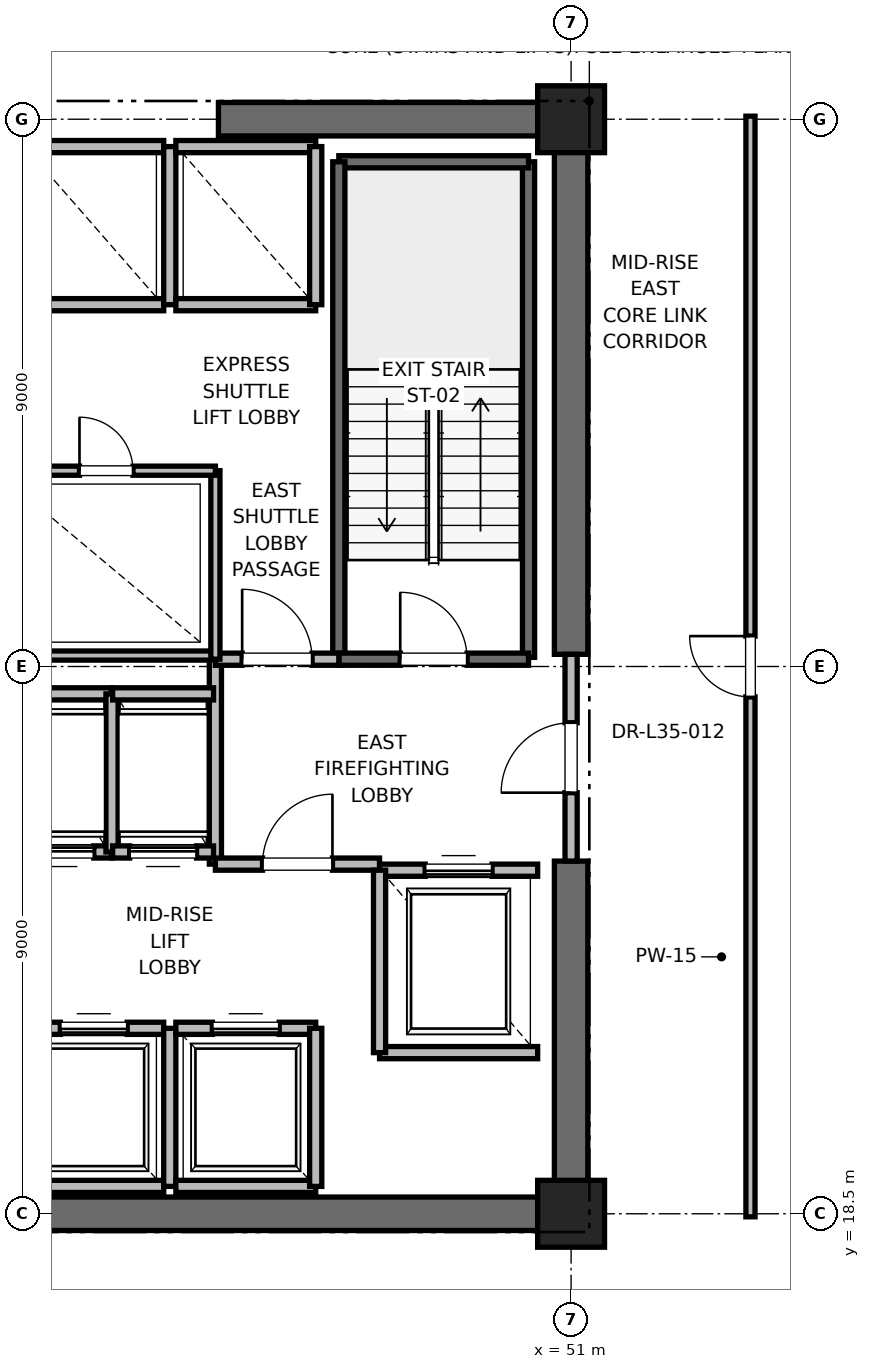
"""IFC4 building model, lengths in metres.
Left out: names, types, materials, properties, quantities, classifications, styles, units other than length and angle.
Written with IfcOpenShell. Run it as: python <this file> out.ifc"""

import sys

from ifc_helpers import new_model, si_unit, direction, frame, frame_2d, origin, origin_2d, place, context, subcontext, project, spatial, rectangle, extrude, element, fill, save


model = new_model("IFC4")
c1 = context("Model", 3, precision=1e-05, world=origin(), true_north=direction((0.0, 1.0)))
c2 = subcontext(c1, "Body", "Model", "MODEL_VIEW")
j1 = project(units=[si_unit("LENGTHUNIT", "METRE"), si_unit("PLANEANGLEUNIT", "RADIAN")], contexts=[c1])
p1 = place(None, origin())
s1 = spatial("IfcSite", under=j1, at=p1, CompositionType="ELEMENT")
p2 = place(p1, origin())
s2 = spatial("IfcBuilding", under=s1, at=p2, CompositionType="ELEMENT")
p3 = place(p2, frame((0.0, 0.0, 152.4)))
s3 = spatial("IfcBuildingStorey", under=s2, at=p3, CompositionType="ELEMENT", Elevation=152.4)
for number, where, z_axis, x_axis in (
    (1, (51.0, 18.5, 0.0), (0.0, 0.0, 1.0), (1.0, 0.0, 0.0)),
    (2, (51.0, 36.5, 0.0), (0.0, 0.0, 1.0), (1.0, 0.0, 0.0)),
):
    element("IfcColumn", number, at=place(p3, frame(where, z_axis=z_axis, x_axis=x_axis)), inside=s3, PredefinedType="PILASTER", context=c2, shape_type="SweptSolid", body=[
        extrude(rectangle(XDim=1.1, YDim=1.1, at=origin_2d()), origin(), (0.0, 0.0, 1.0), 4.0),
    ])
p4 = place(p3, frame((41.8, 18.5, 0.0), z_axis=(0.0, 0.0, 1.0), x_axis=(1.0, 0.0, 0.0)))
e3 = element("IfcWall", 3, at=p4, inside=s3, PredefinedType="SHEAR", context=c2, shape_type="SweptSolid", body=[
    extrude(rectangle(XDim=9.2, YDim=0.55, at=frame_2d((4.6, 0.0))), origin(), (0.0, 0.0, 1.0), 3.775),
])
for number, where, z_axis, x_axis in (
    (4, (45.2, 36.5, 0.0), (0.0, 0.0, 1.0), (1.0, 0.0, 0.0)),
    (5, (51.0, 18.5, 0.0), (0.0, 0.0, 1.0), (0.0, 1.0, 0.0)),
):
    element("IfcWall", number, at=place(p3, frame(where, z_axis=z_axis, x_axis=x_axis)), inside=s3, PredefinedType="SHEAR", context=c2, shape_type="SweptSolid", body=[
        extrude(rectangle(XDim=5.8, YDim=0.55, at=frame_2d((2.9, 0.0))), origin(), (0.0, 0.0, 1.0), 3.775),
    ])
p5 = place(p3, frame((51.0, 27.7, 0.0), z_axis=(0.0, 0.0, 1.0), x_axis=(0.0, 1.0, 0.0)))
e6 = element("IfcWall", 6, at=p5, inside=s3, PredefinedType="SHEAR", context=c2, shape_type="SweptSolid", body=[
    extrude(rectangle(XDim=8.8, YDim=0.55, at=frame_2d((4.4, 0.0))), origin(), (0.0, 0.0, 1.0), 3.775),
])
p6 = place(p3, frame((50.3, 27.65, 0.0), z_axis=(0.0, 0.0, 1.0), x_axis=(0.0, 1.0, 0.0)))
e7 = element("IfcWall", 7, at=p6, inside=s3, PredefinedType="SOLIDWALL", context=c2, shape_type="SweptSolid", body=[
    extrude(rectangle(XDim=8.15, YDim=0.2, at=frame_2d((4.075, 0.0))), origin(), (0.0, 0.0, 1.0), 3.775),
])
p7 = place(p3, frame((47.18, 35.8, 0.0), z_axis=(0.0, 0.0, 1.0), x_axis=(1.0, 0.0, 0.0)))
e8 = element("IfcWall", 8, at=p7, inside=s3, PredefinedType="SOLIDWALL", context=c2, shape_type="SweptSolid", body=[
    extrude(rectangle(XDim=3.12, YDim=0.2, at=frame_2d((1.56, 0.0))), origin(), (0.0, 0.0, 1.0), 3.775),
])
p8 = place(p3, frame((47.18, 27.62, 0.0), z_axis=(0.0, 0.0, 1.0), x_axis=(0.0, 1.0, 0.0)))
e9 = element("IfcWall", 9, at=p8, inside=s3, PredefinedType="SOLIDWALL", context=c2, shape_type="SweptSolid", body=[
    extrude(rectangle(XDim=8.18, YDim=0.2, at=frame_2d((4.09, 0.0))), origin(), (0.0, 0.0, 1.0), 3.775),
])
p9 = place(p3, frame((47.18, 27.62, 0.0), z_axis=(0.0, 0.0, 1.0), x_axis=(1.0, 0.0, 0.0)))
e10 = element("IfcWall", 10, at=p9, inside=s3, PredefinedType="SOLIDWALL", context=c2, shape_type="SweptSolid", body=[
    extrude(rectangle(XDim=3.12, YDim=0.2, at=frame_2d((1.56, 0.0))), origin(), (0.0, 0.0, 1.0), 3.775),
])
p10 = place(p9, frame((1.01, 0.0, 0.0)))
e11 = element("IfcOpeningElement", 11, at=p10, cuts=e10, PredefinedType="OPENING", context=c2, shape_type="SweptSolid", body=[
    extrude(rectangle(XDim=1.1, YDim=2.15, at=frame_2d((0.55, 1.075))), frame((0.0, 0.1, 0.0), z_axis=(0.0, -1.0, 0.0), x_axis=(1.0, 0.0, 0.0)), (0.0, 0.0, 1.0), 0.2),
])
p11 = place(p3, frame((45.15, 24.25, 0.0), z_axis=(0.0, 0.0, 1.0), x_axis=(0.0, 1.0, 0.0)))
e12 = element("IfcWall", 12, at=p11, inside=s3, PredefinedType="PARTITIONING", context=c2, shape_type="SweptSolid", body=[
    extrude(rectangle(XDim=3.37, YDim=0.2, at=frame_2d((1.685, 0.0))), origin(), (0.0, 0.0, 1.0), 3.775),
])
p12 = place(p3, frame((45.15, 24.25, 0.0), z_axis=(0.0, 0.0, 1.0), x_axis=(1.0, 0.0, 0.0)))
e13 = element("IfcWall", 13, at=p12, inside=s3, PredefinedType="PARTITIONING", context=c2, shape_type="SweptSolid", body=[
    extrude(rectangle(XDim=2.7, YDim=0.2, at=frame_2d((1.35, 0.0))), origin(), (0.0, 0.0, 1.0), 3.775),
])
p13 = place(p12, frame((0.775, 0.0, 0.0)))
e14 = element("IfcOpeningElement", 14, at=p13, cuts=e13, PredefinedType="OPENING", context=c2, shape_type="SweptSolid", body=[
    extrude(rectangle(XDim=1.15, YDim=2.2, at=frame_2d((0.575, 1.1))), frame((0.0, 0.1, 0.0), z_axis=(0.0, -1.0, 0.0), x_axis=(1.0, 0.0, 0.0)), (0.0, 0.0, 1.0), 0.2),
])
p14 = place(p3, frame((45.15, 27.62, 0.0), z_axis=(0.0, 0.0, 1.0), x_axis=(1.0, 0.0, 0.0)))
e15 = element("IfcWall", 15, at=p14, inside=s3, PredefinedType="PARTITIONING", context=c2, shape_type="SweptSolid", body=[
    extrude(rectangle(XDim=2.03, YDim=0.2, at=frame_2d((1.015, 0.0))), origin(), (0.0, 0.0, 1.0), 3.775),
])
p15 = place(p14, frame((0.44, 0.0, 0.0)))
e16 = element("IfcOpeningElement", 16, at=p15, cuts=e15, PredefinedType="OPENING", context=c2, shape_type="SweptSolid", body=[
    extrude(rectangle(XDim=1.15, YDim=2.2, at=frame_2d((0.575, 1.1))), frame((0.0, 0.1, 0.0), z_axis=(0.0, -1.0, 0.0), x_axis=(1.0, 0.0, 0.0)), (0.0, 0.0, 1.0), 0.2),
])
p16 = place(p3, frame((51.0, 24.3, 0.0), z_axis=(0.0, 0.0, 1.0), x_axis=(0.0, 1.0, 0.0)))
e17 = element("IfcWall", 17, at=p16, inside=s3, PredefinedType="PARTITIONING", context=c2, shape_type="SweptSolid", body=[
    extrude(rectangle(XDim=3.4, YDim=0.2, at=frame_2d((1.7, 0.0))), origin(), (0.0, 0.0, 1.0), 2.755),
])
p17 = place(p16, frame((1.125, 0.0, 0.0)))
e18 = element("IfcOpeningElement", 18, at=p17, cuts=e17, PredefinedType="OPENING", context=c2, shape_type="SweptSolid", body=[
    extrude(rectangle(XDim=1.15, YDim=2.2, at=frame_2d((0.575, 1.1))), frame((0.0, 0.1, 0.0), z_axis=(0.0, -1.0, 0.0), x_axis=(1.0, 0.0, 0.0)), (0.0, 0.0, 1.0), 0.2),
])
p18 = place(p3, frame((47.85, 21.15, 0.0), z_axis=(0.0, 0.0, 1.0), x_axis=(1.0, 0.0, 0.0)))
e19 = element("IfcWall", 19, at=p18, inside=s3, PredefinedType="SOLIDWALL", context=c2, shape_type="SweptSolid", body=[
    extrude(rectangle(XDim=2.6, YDim=0.2, at=frame_2d((1.3, 0.0))), origin(), (0.0, 0.0, 1.0), 3.775),
])
p19 = place(p3, frame((50.45, 24.15, 0.0), z_axis=(0.0, 0.0, 1.0), x_axis=(-1.0, 0.0, 0.0)))
e20 = element("IfcWall", 20, at=p19, inside=s3, PredefinedType="SOLIDWALL", context=c2, shape_type="SweptSolid", body=[
    extrude(rectangle(XDim=2.6, YDim=0.2, at=frame_2d((1.3, 0.0))), origin(), (0.0, 0.0, 1.0), 2.755),
])
p20 = place(p19, frame((0.75, 0.0, 0.0)))
e21 = element("IfcOpeningElement", 21, at=p20, cuts=e20, PredefinedType="OPENING", context=c2, shape_type="SweptSolid", body=[
    extrude(rectangle(XDim=1.1, YDim=2.2, at=frame_2d((0.55, 1.1))), frame((0.0, 0.1, 0.0), z_axis=(0.0, -1.0, 0.0), x_axis=(1.0, 0.0, 0.0)), (0.0, 0.0, 1.0), 0.2),
])
p21 = place(p3, frame((47.85, 24.15, 0.0), z_axis=(0.0, 0.0, 1.0), x_axis=(0.0, -1.0, 0.0)))
e22 = element("IfcWall", 22, at=p21, inside=s3, PredefinedType="SOLIDWALL", context=c2, shape_type="SweptSolid", body=[
    extrude(rectangle(XDim=3.0, YDim=0.2, at=frame_2d((1.5, 0.0))), origin(), (0.0, 0.0, 1.0), 3.775),
])
p22 = place(p3, frame((42.0, 18.95, 0.0), z_axis=(0.0, 0.0, 1.0), x_axis=(1.0, 0.0, 0.0)))
e23 = element("IfcWall", 23, at=p22, inside=s3, PredefinedType="SOLIDWALL", context=c2, shape_type="SweptSolid", body=[
    extrude(rectangle(XDim=2.3, YDim=0.2, at=frame_2d((1.15, 0.0))), origin(), (0.0, 0.0, 1.0), 2.755),
])
p23 = place(p3, frame((44.3, 21.55, 0.0), z_axis=(0.0, 0.0, 1.0), x_axis=(-1.0, 0.0, 0.0)))
e24 = element("IfcWall", 24, at=p23, inside=s3, PredefinedType="SOLIDWALL", context=c2, shape_type="SweptSolid", body=[
    extrude(rectangle(XDim=2.3, YDim=0.2, at=frame_2d((1.15, 0.0))), origin(), (0.0, 0.0, 1.0), 3.775),
])
p24 = place(p23, frame((0.6, 0.0, 0.0)))
e25 = element("IfcOpeningElement", 25, at=p24, cuts=e24, PredefinedType="OPENING", context=c2, shape_type="SweptSolid", body=[
    extrude(rectangle(XDim=1.1, YDim=2.2, at=frame_2d((0.55, 1.1))), frame((0.0, 0.1, 0.0), z_axis=(0.0, -1.0, 0.0), x_axis=(1.0, 0.0, 0.0)), (0.0, 0.0, 1.0), 0.2),
])
p25 = place(p3, frame((44.4, 18.95, 0.0), z_axis=(0.0, 0.0, 1.0), x_axis=(0.0, 1.0, 0.0)))
e26 = element("IfcWall", 26, at=p25, inside=s3, PredefinedType="SOLIDWALL", context=c2, shape_type="SweptSolid", body=[
    extrude(rectangle(XDim=2.6, YDim=0.2, at=frame_2d((1.3, 0.0))), origin(), (0.0, 0.0, 1.0), 3.775),
])
p26 = place(p3, frame((44.5, 18.95, 0.0), z_axis=(0.0, 0.0, 1.0), x_axis=(1.0, 0.0, 0.0)))
e27 = element("IfcWall", 27, at=p26, inside=s3, PredefinedType="SOLIDWALL", context=c2, shape_type="SweptSolid", body=[
    extrude(rectangle(XDim=2.3, YDim=0.2, at=frame_2d((1.15, 0.0))), origin(), (0.0, 0.0, 1.0), 3.775),
])
p27 = place(p3, frame((46.8, 21.55, 0.0), z_axis=(0.0, 0.0, 1.0), x_axis=(-1.0, 0.0, 0.0)))
e28 = element("IfcWall", 28, at=p27, inside=s3, PredefinedType="SOLIDWALL", context=c2, shape_type="SweptSolid", body=[
    extrude(rectangle(XDim=2.3, YDim=0.2, at=frame_2d((1.15, 0.0))), origin(), (0.0, 0.0, 1.0), 3.775),
])
p28 = place(p27, frame((0.6, 0.0, 0.0)))
e29 = element("IfcOpeningElement", 29, at=p28, cuts=e28, PredefinedType="OPENING", context=c2, shape_type="SweptSolid", body=[
    extrude(rectangle(XDim=1.1, YDim=2.2, at=frame_2d((0.55, 1.1))), frame((0.0, 0.1, 0.0), z_axis=(0.0, -1.0, 0.0), x_axis=(1.0, 0.0, 0.0)), (0.0, 0.0, 1.0), 0.2),
])
p29 = place(p3, frame((46.8, 18.95, 0.0), z_axis=(0.0, 0.0, 1.0), x_axis=(0.0, 1.0, 0.0)))
e30 = element("IfcWall", 30, at=p29, inside=s3, PredefinedType="SOLIDWALL", context=c2, shape_type="SweptSolid", body=[
    extrude(rectangle(XDim=2.6, YDim=0.2, at=frame_2d((1.3, 0.0))), origin(), (0.0, 0.0, 1.0), 3.775),
])
p30 = place(p3, frame((41.76, 24.45, 0.0), z_axis=(0.0, 0.0, 1.0), x_axis=(1.0, 0.0, 0.0)))
e31 = element("IfcWall", 31, at=p30, inside=s3, PredefinedType="SOLIDWALL", context=c2, shape_type="SweptSolid", body=[
    extrude(rectangle(XDim=1.68, YDim=0.2, at=frame_2d((0.84, 0.0))), origin(), (0.0, 0.0, 1.0), 3.775),
])
p31 = place(p30, frame((0.29, 0.0, 0.0)))
e32 = element("IfcOpeningElement", 32, at=p31, cuts=e31, PredefinedType="OPENING", context=c2, shape_type="SweptSolid", body=[
    extrude(rectangle(XDim=1.1, YDim=2.2, at=frame_2d((0.55, 1.1))), frame((0.0, 0.1, 0.0), z_axis=(0.0, -1.0, 0.0), x_axis=(1.0, 0.0, 0.0)), (0.0, 0.0, 1.0), 0.2),
])
p32 = place(p3, frame((43.44, 27.05, 0.0), z_axis=(0.0, 0.0, 1.0), x_axis=(-1.0, 0.0, 0.0)))
e33 = element("IfcWall", 33, at=p32, inside=s3, PredefinedType="SOLIDWALL", context=c2, shape_type="SweptSolid", body=[
    extrude(rectangle(XDim=1.68, YDim=0.2, at=frame_2d((0.84, 0.0))), origin(), (0.0, 0.0, 1.0), 3.775),
])
p33 = place(p3, frame((43.45, 24.45, 0.0), z_axis=(0.0, 0.0, 1.0), x_axis=(0.0, 1.0, 0.0)))
e34 = element("IfcWall", 34, at=p33, inside=s3, PredefinedType="SOLIDWALL", context=c2, shape_type="SweptSolid", body=[
    extrude(rectangle(XDim=2.6, YDim=0.2, at=frame_2d((1.3, 0.0))), origin(), (0.0, 0.0, 1.0), 3.775),
])
p34 = place(p3, frame((43.46, 24.45, 0.0), z_axis=(0.0, 0.0, 1.0), x_axis=(1.0, 0.0, 0.0)))
e35 = element("IfcWall", 35, at=p34, inside=s3, PredefinedType="SOLIDWALL", context=c2, shape_type="SweptSolid", body=[
    extrude(rectangle(XDim=1.66, YDim=0.2, at=frame_2d((0.83, 0.0))), origin(), (0.0, 0.0, 1.0), 3.775),
])
p35 = place(p34, frame((0.28, 0.0, 0.0)))
e36 = element("IfcOpeningElement", 36, at=p35, cuts=e35, PredefinedType="OPENING", context=c2, shape_type="SweptSolid", body=[
    extrude(rectangle(XDim=1.1, YDim=2.2, at=frame_2d((0.55, 1.1))), frame((0.0, 0.1, 0.0), z_axis=(0.0, -1.0, 0.0), x_axis=(1.0, 0.0, 0.0)), (0.0, 0.0, 1.0), 0.2),
])
p36 = place(p3, frame((45.12, 27.05, 0.0), z_axis=(0.0, 0.0, 1.0), x_axis=(-1.0, 0.0, 0.0)))
e37 = element("IfcWall", 37, at=p36, inside=s3, PredefinedType="SOLIDWALL", context=c2, shape_type="SweptSolid", body=[
    extrude(rectangle(XDim=1.66, YDim=0.2, at=frame_2d((0.83, 0.0))), origin(), (0.0, 0.0, 1.0), 3.775),
])
p37 = place(p3, frame((42.0, 33.45, 0.0), z_axis=(0.0, 0.0, 1.0), x_axis=(1.0, 0.0, 0.0)))
e38 = element("IfcWall", 38, at=p37, inside=s3, PredefinedType="SOLIDWALL", context=c2, shape_type="SweptSolid", body=[
    extrude(rectangle(XDim=2.3, YDim=0.2, at=frame_2d((1.15, 0.0))), origin(), (0.0, 0.0, 1.0), 3.775),
])
p38 = place(p3, frame((44.3, 36.05, 0.0), z_axis=(0.0, 0.0, 1.0), x_axis=(-1.0, 0.0, 0.0)))
e39 = element("IfcWall", 39, at=p38, inside=s3, PredefinedType="SOLIDWALL", context=c2, shape_type="SweptSolid", body=[
    extrude(rectangle(XDim=2.3, YDim=0.2, at=frame_2d((1.15, 0.0))), origin(), (0.0, 0.0, 1.0), 2.755),
])
p39 = place(p3, frame((44.4, 33.45, 0.0), z_axis=(0.0, 0.0, 1.0), x_axis=(0.0, 1.0, 0.0)))
e40 = element("IfcWall", 40, at=p39, inside=s3, PredefinedType="SOLIDWALL", context=c2, shape_type="SweptSolid", body=[
    extrude(rectangle(XDim=2.6, YDim=0.2, at=frame_2d((1.3, 0.0))), origin(), (0.0, 0.0, 1.0), 2.755),
])
p40 = place(p3, frame((44.5, 33.45, 0.0), z_axis=(0.0, 0.0, 1.0), x_axis=(1.0, 0.0, 0.0)))
e41 = element("IfcWall", 41, at=p40, inside=s3, PredefinedType="SOLIDWALL", context=c2, shape_type="SweptSolid", body=[
    extrude(rectangle(XDim=2.3, YDim=0.2, at=frame_2d((1.15, 0.0))), origin(), (0.0, 0.0, 1.0), 3.775),
])
p41 = place(p3, frame((46.8, 36.05, 0.0), z_axis=(0.0, 0.0, 1.0), x_axis=(-1.0, 0.0, 0.0)))
e42 = element("IfcWall", 42, at=p41, inside=s3, PredefinedType="SOLIDWALL", context=c2, shape_type="SweptSolid", body=[
    extrude(rectangle(XDim=2.3, YDim=0.2, at=frame_2d((1.15, 0.0))), origin(), (0.0, 0.0, 1.0), 2.755),
])
p42 = place(p3, frame((46.8, 33.45, 0.0), z_axis=(0.0, 0.0, 1.0), x_axis=(0.0, 1.0, 0.0)))
e43 = element("IfcWall", 43, at=p42, inside=s3, PredefinedType="SOLIDWALL", context=c2, shape_type="SweptSolid", body=[
    extrude(rectangle(XDim=2.6, YDim=0.2, at=frame_2d((1.3, 0.0))), origin(), (0.0, 0.0, 1.0), 3.775),
])
p43 = place(p3, frame((41.56, 27.68, 0.0), z_axis=(0.0, 0.0, 1.0), x_axis=(1.0, 0.0, 0.0)))
e44 = element("IfcWall", 44, at=p43, inside=s3, PredefinedType="PARTITIONING", context=c2, shape_type="SweptSolid", body=[
    extrude(rectangle(XDim=3.59, YDim=0.15, at=frame_2d((1.795, 0.0))), origin(), (0.0, 0.0, 1.0), 2.85),
])
p44 = place(p3, frame((45.15, 27.62, 0.0), z_axis=(0.0, 0.0, 1.0), x_axis=(0.0, 1.0, 0.0)))
e45 = element("IfcWall", 45, at=p44, inside=s3, PredefinedType="PARTITIONING", context=c2, shape_type="SweptSolid", body=[
    extrude(rectangle(XDim=3.1, YDim=0.15, at=frame_2d((1.55, 0.0))), origin(), (0.0, 0.0, 1.0), 2.85),
])
p45 = place(p3, frame((41.56, 30.72, 0.0), z_axis=(0.0, 0.0, 1.0), x_axis=(1.0, 0.0, 0.0)))
e46 = element("IfcWall", 46, at=p45, inside=s3, PredefinedType="PARTITIONING", context=c2, shape_type="SweptSolid", body=[
    extrude(rectangle(XDim=3.59, YDim=0.15, at=frame_2d((1.795, 0.0))), origin(), (0.0, 0.0, 1.0), 2.85),
])
p46 = place(p45, frame((1.355, 0.0, 0.0)))
e47 = element("IfcOpeningElement", 47, at=p46, cuts=e46, PredefinedType="OPENING", context=c2, shape_type="SweptSolid", body=[
    extrude(rectangle(XDim=0.88, YDim=2.1, at=frame_2d((0.44, 1.05))), frame((0.0, 0.075, 0.0), z_axis=(0.0, -1.0, 0.0), x_axis=(1.0, 0.0, 0.0)), (0.0, 0.0, 1.0), 0.15),
])
p47 = place(p3, frame((53.95, 18.45, 0.0), z_axis=(0.0, 0.0, 1.0), x_axis=(0.0, 1.0, 0.0)))
e48 = element("IfcWall", 48, at=p47, inside=s3, PredefinedType="PARTITIONING", context=c2, shape_type="SweptSolid", body=[
    extrude(rectangle(XDim=18.1, YDim=0.15, at=frame_2d((9.05, 0.0))), origin(), (0.0, 0.0, 1.0), 2.85),
])
p48 = place(p47, frame((8.55, 0.0, 0.0)))
e49 = element("IfcOpeningElement", 49, at=p48, cuts=e48, PredefinedType="OPENING", context=c2, shape_type="SweptSolid", body=[
    extrude(rectangle(XDim=1.0, YDim=2.15, at=frame_2d((0.5, 1.075))), frame((0.0, 0.075, 0.0), z_axis=(0.0, -1.0, 0.0), x_axis=(1.0, 0.0, 0.0)), (0.0, 0.0, 1.0), 0.15),
])
p49 = place(p10, origin())
e50 = element("IfcDoor", 50, at=p49, inside=s3, OperationType="SINGLE_SWING_LEFT", PredefinedType="DOOR", context=c2, shape_type="SweptSolid", body=[
    extrude(rectangle(XDim=1.1, YDim=2.15, at=frame_2d((0.55, 1.075))), frame((0.0, 0.025, 0.0), z_axis=(0.0, -1.0, 0.0), x_axis=(1.0, 0.0, 0.0)), (0.0, 0.0, 1.0), 0.05),
])
fill(e11, e50)
p50 = place(p13, origin())
e51 = element("IfcDoor", 51, at=p50, inside=s3, OperationType="SINGLE_SWING_RIGHT", PredefinedType="DOOR", context=c2, shape_type="SweptSolid", body=[
    extrude(rectangle(XDim=1.15, YDim=2.2, at=frame_2d((0.575, 1.1))), frame((0.0, 0.025, 0.0), z_axis=(0.0, -1.0, 0.0), x_axis=(1.0, 0.0, 0.0)), (0.0, 0.0, 1.0), 0.05),
])
fill(e14, e51)
p51 = place(p15, origin())
e52 = element("IfcDoor", 52, at=p51, inside=s3, OperationType="SINGLE_SWING_LEFT", PredefinedType="DOOR", context=c2, shape_type="SweptSolid", body=[
    extrude(rectangle(XDim=1.15, YDim=2.2, at=frame_2d((0.575, 1.1))), frame((0.0, 0.025, 0.0), z_axis=(0.0, -1.0, 0.0), x_axis=(1.0, 0.0, 0.0)), (0.0, 0.0, 1.0), 0.05),
])
fill(e16, e52)
p52 = place(p17, origin())
e53 = element("IfcDoor", 53, at=p52, inside=s3, OperationType="SINGLE_SWING_LEFT", PredefinedType="DOOR", context=c2, shape_type="SweptSolid", body=[
    extrude(rectangle(XDim=1.15, YDim=2.2, at=frame_2d((0.575, 1.1))), frame((0.0, 0.025, 0.0), z_axis=(0.0, -1.0, 0.0), x_axis=(1.0, 0.0, 0.0)), (0.0, 0.0, 1.0), 0.05),
])
fill(e18, e53)
p53 = place(p20, origin())
e54 = element("IfcDoor", 54, at=p53, inside=s3, OperationType="SLIDING_TO_RIGHT", PredefinedType="DOOR", context=c2, shape_type="SweptSolid", body=[
    extrude(rectangle(XDim=1.1, YDim=2.2, at=frame_2d((0.55, 1.1))), frame((0.0, 0.025, 0.0), z_axis=(0.0, -1.0, 0.0), x_axis=(1.0, 0.0, 0.0)), (0.0, 0.0, 1.0), 0.05),
])
fill(e21, e54)
p54 = place(p24, origin())
e55 = element("IfcDoor", 55, at=p54, inside=s3, OperationType="SLIDING_TO_RIGHT", PredefinedType="DOOR", context=c2, shape_type="SweptSolid", body=[
    extrude(rectangle(XDim=1.1, YDim=2.2, at=frame_2d((0.55, 1.1))), frame((0.0, 0.025, 0.0), z_axis=(0.0, -1.0, 0.0), x_axis=(1.0, 0.0, 0.0)), (0.0, 0.0, 1.0), 0.05),
])
fill(e25, e55)
p55 = place(p28, origin())
e56 = element("IfcDoor", 56, at=p55, inside=s3, OperationType="SLIDING_TO_RIGHT", PredefinedType="DOOR", context=c2, shape_type="SweptSolid", body=[
    extrude(rectangle(XDim=1.1, YDim=2.2, at=frame_2d((0.55, 1.1))), frame((0.0, 0.025, 0.0), z_axis=(0.0, -1.0, 0.0), x_axis=(1.0, 0.0, 0.0)), (0.0, 0.0, 1.0), 0.05),
])
fill(e29, e56)
p56 = place(p31, origin())
e57 = element("IfcDoor", 57, at=p56, inside=s3, OperationType="SLIDING_TO_RIGHT", PredefinedType="DOOR", context=c2, shape_type="SweptSolid", body=[
    extrude(rectangle(XDim=1.1, YDim=2.2, at=frame_2d((0.55, 1.1))), frame((0.0, 0.025, 0.0), z_axis=(0.0, -1.0, 0.0), x_axis=(1.0, 0.0, 0.0)), (0.0, 0.0, 1.0), 0.05),
])
fill(e32, e57)
p57 = place(p35, origin())
e58 = element("IfcDoor", 58, at=p57, inside=s3, OperationType="SLIDING_TO_RIGHT", PredefinedType="DOOR", context=c2, shape_type="SweptSolid", body=[
    extrude(rectangle(XDim=1.1, YDim=2.2, at=frame_2d((0.55, 1.1))), frame((0.0, 0.025, 0.0), z_axis=(0.0, -1.0, 0.0), x_axis=(1.0, 0.0, 0.0)), (0.0, 0.0, 1.0), 0.05),
])
fill(e36, e58)
p58 = place(p46, origin())
e59 = element("IfcDoor", 59, at=p58, inside=s3, OperationType="SINGLE_SWING_LEFT", PredefinedType="DOOR", context=c2, shape_type="SweptSolid", body=[
    extrude(rectangle(XDim=0.88, YDim=2.1, at=frame_2d((0.44, 1.05))), frame((0.0, 0.025, 0.0), z_axis=(0.0, -1.0, 0.0), x_axis=(1.0, 0.0, 0.0)), (0.0, 0.0, 1.0), 0.05),
])
fill(e47, e59)
p59 = place(p48, origin())
e60 = element("IfcDoor", 60, at=p59, inside=s3, OperationType="SINGLE_SWING_RIGHT", PredefinedType="DOOR", context=c2, shape_type="SweptSolid", body=[
    extrude(rectangle(XDim=1.0, YDim=2.15, at=frame_2d((0.5, 1.075))), frame((0.0, 0.025, 0.0), z_axis=(0.0, -1.0, 0.0), x_axis=(1.0, 0.0, 0.0)), (0.0, 0.0, 1.0), 0.05),
])
fill(e49, e60)
save(model, sys.argv[1])
